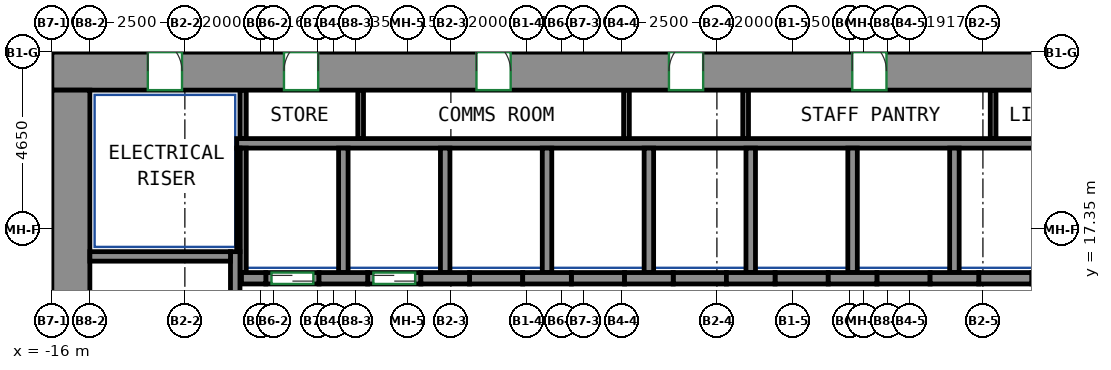
"""IFC4 building model, lengths in metres.
Left out: names, types, materials, properties, quantities, classifications, styles, units other than length and angle.
Written with IfcOpenShell. Run it as: python <this file> out.ifc"""

import sys

from ifc_helpers import new_model, si_unit, direction, frame, frame_2d, origin, place, context, subcontext, project, spatial, rectangle, extrude, source, transform, mapped, element, fill, save


model = new_model("IFC4")
c1 = context("Model", 3, precision=1e-05, world=origin(), true_north=direction((0.0, 1.0)))
c2 = subcontext(c1, "Body", "Model", "MODEL_VIEW")
j1 = project(units=[si_unit("LENGTHUNIT", "METRE"), si_unit("PLANEANGLEUNIT", "RADIAN")], contexts=[c1])
p1 = place(None, origin())
s1 = spatial("IfcSite", under=j1, at=p1, CompositionType="ELEMENT")
p2 = place(p1, origin())
s2 = spatial("IfcBuilding", under=s1, at=p2, CompositionType="ELEMENT")
p3 = place(p2, frame((0.0, 0.0, 75.2)))
s3 = spatial("IfcBuildingStorey", under=s2, at=p3, CompositionType="ELEMENT", Elevation=75.2)
m1 = source(origin(), c2, "Body", "SweptSolid", [
    extrude(rectangle(XDim=34.1, YDim=1.0, at=frame_2d((17.05, 0.0))), origin(), (0.0, 0.0, 1.0), 3.72),
])
p4 = place(p3, frame((-16.0, 21.5, 0.0), z_axis=(0.0, 0.0, 1.0), x_axis=(1.0, 0.0, 0.0)))
e1 = element("IfcWall", 1, at=p4, inside=s3, PredefinedType="SHEAR", context=c2, shape_type="MappedRepresentation", body=[
    mapped(m1, transform((0.0, 0.0, 0.0))),
])
p5 = place(p4, frame((6.108, 0.0, 0.0)))
e2 = element("IfcOpeningElement", 2, at=p5, cuts=e1, PredefinedType="OPENING", context=c2, shape_type="SweptSolid", body=[
    extrude(rectangle(XDim=0.9, YDim=2.1, at=frame_2d((0.45, 1.05))), frame((0.0, 0.51, 0.0), z_axis=(0.0, -1.0, 0.0), x_axis=(1.0, 0.0, 0.0)), (0.0, 0.0, 1.0), 1.02),
])
p6 = place(p4, frame((11.173, 0.0, 0.0)))
e3 = element("IfcOpeningElement", 3, at=p6, cuts=e1, PredefinedType="OPENING", context=c2, shape_type="SweptSolid", body=[
    extrude(rectangle(XDim=0.9, YDim=2.1, at=frame_2d((0.45, 1.05))), frame((0.0, 0.51, 0.0), z_axis=(0.0, -1.0, 0.0), x_axis=(1.0, 0.0, 0.0)), (0.0, 0.0, 1.0), 1.02),
])
p7 = place(p4, frame((16.238, 0.0, 0.0)))
e4 = element("IfcOpeningElement", 4, at=p7, cuts=e1, PredefinedType="OPENING", context=c2, shape_type="SweptSolid", body=[
    extrude(rectangle(XDim=0.9, YDim=2.1, at=frame_2d((0.45, 1.05))), frame((0.0, 0.51, 0.0), z_axis=(0.0, -1.0, 0.0), x_axis=(1.0, 0.0, 0.0)), (0.0, 0.0, 1.0), 1.02),
])
p8 = place(p4, frame((21.062, 0.0, 0.0)))
e5 = element("IfcOpeningElement", 5, at=p8, cuts=e1, PredefinedType="OPENING", context=c2, shape_type="SweptSolid", body=[
    extrude(rectangle(XDim=0.9, YDim=2.1, at=frame_2d((0.45, 1.05))), frame((0.0, 0.51, 0.0), z_axis=(0.0, -1.0, 0.0), x_axis=(1.0, 0.0, 0.0)), (0.0, 0.0, 1.0), 1.02),
])
p9 = place(p4, frame((26.489, 0.0, 0.0)))
e6 = element("IfcOpeningElement", 6, at=p9, cuts=e1, PredefinedType="OPENING", context=c2, shape_type="SweptSolid", body=[
    extrude(rectangle(XDim=0.9, YDim=2.1, at=frame_2d((0.45, 1.05))), frame((0.0, 0.51, 0.0), z_axis=(0.0, -1.0, 0.0), x_axis=(1.0, 0.0, 0.0)), (0.0, 0.0, 1.0), 1.02),
])
p10 = place(p4, frame((2.525, 0.0, 0.0)))
e7 = element("IfcOpeningElement", 7, at=p10, cuts=e1, PredefinedType="OPENING", context=c2, shape_type="SweptSolid", body=[
    extrude(rectangle(XDim=0.9, YDim=2.1, at=frame_2d((0.45, 1.05))), frame((0.0, 0.51, 0.0), z_axis=(0.0, -1.0, 0.0), x_axis=(1.0, 0.0, 0.0)), (0.0, 0.0, 1.0), 1.02),
])
p11 = place(p4, frame((30.675, 0.0, 0.0)))
e8 = element("IfcOpeningElement", 8, at=p11, cuts=e1, PredefinedType="OPENING", context=c2, shape_type="SweptSolid", body=[
    extrude(rectangle(XDim=0.9, YDim=2.1, at=frame_2d((0.45, 1.05))), frame((0.0, 0.51, 0.0), z_axis=(0.0, -1.0, 0.0), x_axis=(1.0, 0.0, 0.0)), (0.0, 0.0, 1.0), 1.02),
])
m2 = source(origin(), c2, "Body", "SweptSolid", [
    extrude(rectangle(XDim=12.0, YDim=1.0, at=frame_2d((6.0, 0.0))), origin(), (0.0, 0.0, 1.0), 3.72),
])
p12 = place(p3, frame((-15.5, 9.0, 0.0), z_axis=(0.0, 0.0, 1.0), x_axis=(0.0, 1.0, 0.0)))
e9 = element("IfcWall", 9, at=p12, inside=s3, PredefinedType="SHEAR", context=c2, shape_type="MappedRepresentation", body=[
    mapped(m2, transform((0.0, 0.0, 0.0))),
])
m3 = source(origin(), c2, "Body", "SweptSolid", [
    extrude(rectangle(XDim=7.75, YDim=0.25, at=frame_2d((3.875, 0.0))), origin(), (0.0, 0.0, 1.0), 3.72),
])
p13 = place(p3, frame((-11.175, 9.0, 0.0), z_axis=(0.0, 0.0, 1.0), x_axis=(0.0, 1.0, 0.0)))
e10 = element("IfcWall", 10, at=p13, inside=s3, PredefinedType="SHEAR", context=c2, shape_type="MappedRepresentation", body=[
    mapped(m3, transform((0.0, 0.0, 0.0))),
])
m4 = source(origin(), c2, "Body", "SweptSolid", [
    extrude(rectangle(XDim=3.7, YDim=0.25, at=frame_2d((1.85, 0.0))), origin(), (0.0, 0.0, 1.0), 3.72),
])
p14 = place(p3, frame((-15.0, 16.625, 0.0), z_axis=(0.0, 0.0, 1.0), x_axis=(1.0, 0.0, 0.0)))
e11 = element("IfcWall", 11, at=p14, inside=s3, PredefinedType="SHEAR", context=c2, shape_type="MappedRepresentation", body=[
    mapped(m4, transform((0.0, 0.0, 0.0))),
])
m5 = source(origin(), c2, "Body", "SweptSolid", [
    extrude(rectangle(XDim=0.64, YDim=0.3, at=frame_2d((0.32, 0.0))), origin(), (0.0, 0.0, 1.0), 3.72),
])
p15 = place(p3, frame((-11.01, 16.05, 0.0), z_axis=(0.0, 0.0, 1.0), x_axis=(1.0, 0.0, 0.0)))
e12 = element("IfcWall", 12, at=p15, inside=s3, PredefinedType="SHEAR", context=c2, shape_type="MappedRepresentation", body=[
    mapped(m5, transform((0.0, 0.0, 0.0))),
])
m6 = source(origin(), c2, "Body", "SweptSolid", [
    extrude(rectangle(XDim=1.28, YDim=0.3, at=frame_2d((0.64, 0.0))), origin(), (0.0, 0.0, 1.0), 3.72),
])
for number, where, z_axis, x_axis in (
    (13, (-8.97, 16.05, 0.0), (0.0, 0.0, 1.0), (1.0, 0.0, 0.0)),
    (14, (-6.29, 16.05, 0.0), (0.0, 0.0, 1.0), (1.0, 0.0, 0.0)),
    (15, (-3.61, 16.05, 0.0), (0.0, 0.0, 1.0), (1.0, 0.0, 0.0)),
    (16, (-0.93, 16.05, 0.0), (0.0, 0.0, 1.0), (1.0, 0.0, 0.0)),
    (17, (1.75, 16.05, 0.0), (0.0, 0.0, 1.0), (1.0, 0.0, 0.0)),
    (18, (4.43, 16.05, 0.0), (0.0, 0.0, 1.0), (1.0, 0.0, 0.0)),
):
    element("IfcWall", number, at=place(p3, frame(where, z_axis=z_axis, x_axis=x_axis)), inside=s3, PredefinedType="SHEAR", context=c2, shape_type="MappedRepresentation", body=[
        mapped(m6, transform((0.0, 0.0, 0.0))),
    ])
m7 = source(origin(), c2, "Body", "SweptSolid", [
    extrude(rectangle(XDim=1.28, YDim=0.3, at=frame_2d((0.64, 0.0))), origin(), (0.0, 0.0, 1.0), 3.72),
])
p16 = place(p3, frame((7.11, 16.05, 0.0), z_axis=(0.0, 0.0, 1.0), x_axis=(1.0, 0.0, 0.0)))
e19 = element("IfcWall", 19, at=p16, inside=s3, PredefinedType="SHEAR", context=c2, shape_type="MappedRepresentation", body=[
    mapped(m7, transform((0.0, 0.0, 0.0))),
])
m8 = source(origin(), c2, "Body", "SweptSolid", [
    extrude(rectangle(XDim=1.4, YDim=0.3, at=frame_2d((0.7, 0.0))), origin(), (0.0, 0.0, 1.0), 3.72),
])
p17 = place(p3, frame((-10.37, 16.05, 0.0), z_axis=(0.0, 0.0, 1.0), x_axis=(1.0, 0.0, 0.0)))
e20 = element("IfcWall", 20, at=p17, inside=s3, PredefinedType="PARTITIONING", context=c2, shape_type="MappedRepresentation", body=[
    mapped(m8, transform((0.0, 0.0, 0.0))),
])
p18 = place(p17, frame((0.15, 0.0, 0.0)))
e21 = element("IfcOpeningElement", 21, at=p18, cuts=e20, PredefinedType="OPENING", context=c2, shape_type="SweptSolid", body=[
    extrude(rectangle(XDim=1.1, YDim=2.1, at=frame_2d((0.55, 1.05))), frame((0.0, 0.16, 0.0), z_axis=(0.0, -1.0, 0.0), x_axis=(1.0, 0.0, 0.0)), (0.0, 0.0, 1.0), 0.32),
])
m9 = source(origin(), c2, "Body", "SweptSolid", [
    extrude(rectangle(XDim=1.4, YDim=0.3, at=frame_2d((0.7, 0.0))), origin(), (0.0, 0.0, 1.0), 3.72),
])
p19 = place(p3, frame((-7.69, 16.05, 0.0), z_axis=(0.0, 0.0, 1.0), x_axis=(1.0, 0.0, 0.0)))
e22 = element("IfcWall", 22, at=p19, inside=s3, PredefinedType="PARTITIONING", context=c2, shape_type="MappedRepresentation", body=[
    mapped(m9, transform((0.0, 0.0, 0.0))),
])
p20 = place(p19, frame((0.15, 0.0, 0.0)))
e23 = element("IfcOpeningElement", 23, at=p20, cuts=e22, PredefinedType="OPENING", context=c2, shape_type="SweptSolid", body=[
    extrude(rectangle(XDim=1.1, YDim=2.1, at=frame_2d((0.55, 1.05))), frame((0.0, 0.16, 0.0), z_axis=(0.0, -1.0, 0.0), x_axis=(1.0, 0.0, 0.0)), (0.0, 0.0, 1.0), 0.32),
])
p21 = place(p3, frame((-5.01, 16.05, 0.0), z_axis=(0.0, 0.0, 1.0), x_axis=(1.0, 0.0, 0.0)))
e24 = element("IfcWall", 24, at=p21, inside=s3, PredefinedType="PARTITIONING", context=c2, shape_type="MappedRepresentation", body=[
    mapped(m9, transform((0.0, 0.0, 0.0))),
])
p22 = place(p3, frame((-2.33, 16.05, 0.0), z_axis=(0.0, 0.0, 1.0), x_axis=(1.0, 0.0, 0.0)))
e25 = element("IfcWall", 25, at=p22, inside=s3, PredefinedType="PARTITIONING", context=c2, shape_type="MappedRepresentation", body=[
    mapped(m8, transform((0.0, 0.0, 0.0))),
])
for number, where, z_axis, x_axis in (
    (26, (0.35, 16.05, 0.0), (0.0, 0.0, 1.0), (1.0, 0.0, 0.0)),
    (27, (3.03, 16.05, 0.0), (0.0, 0.0, 1.0), (1.0, 0.0, 0.0)),
):
    element("IfcWall", number, at=place(p3, frame(where, z_axis=z_axis, x_axis=x_axis)), inside=s3, PredefinedType="PARTITIONING", context=c2, shape_type="MappedRepresentation", body=[
        mapped(m9, transform((0.0, 0.0, 0.0))),
    ])
for number, where, z_axis, x_axis in (
    (28, (5.71, 16.05, 0.0), (0.0, 0.0, 1.0), (1.0, 0.0, 0.0)),
    (29, (8.39, 16.05, 0.0), (0.0, 0.0, 1.0), (1.0, 0.0, 0.0)),
):
    element("IfcWall", number, at=place(p3, frame(where, z_axis=z_axis, x_axis=x_axis)), inside=s3, PredefinedType="PARTITIONING", context=c2, shape_type="MappedRepresentation", body=[
        mapped(m8, transform((0.0, 0.0, 0.0))),
    ])
m10 = source(origin(), c2, "Body", "SweptSolid", [
    extrude(rectangle(XDim=24.37, YDim=0.25, at=frame_2d((12.185, 0.0))), origin(), (0.0, 0.0, 1.0), 3.72),
])
p23 = place(p3, frame((-11.135, 19.6, 0.0), z_axis=(0.0, 0.0, 1.0), x_axis=(1.0, 0.0, 0.0)))
e30 = element("IfcWall", 30, at=p23, inside=s3, PredefinedType="PARTITIONING", context=c2, shape_type="MappedRepresentation", body=[
    mapped(m10, transform((0.0, 0.0, 0.0))),
])
m11 = source(origin(), c2, "Body", "SweptSolid", [
    extrude(rectangle(XDim=3.275, YDim=0.165, at=frame_2d((1.638, 0.0))), origin(), (0.0, 0.0, 1.0), 3.72),
])
p24 = place(p3, frame((-10.968, 16.2, 0.0), z_axis=(0.0, 0.0, 1.0), x_axis=(0.0, 1.0, 0.0)))
e31 = element("IfcWall", 31, at=p24, inside=s3, PredefinedType="PARTITIONING", context=c2, shape_type="MappedRepresentation", body=[
    mapped(m11, transform((0.0, 0.0, 0.0))),
])
m12 = source(origin(), c2, "Body", "SweptSolid", [
    extrude(rectangle(XDim=1.275, YDim=0.165, at=frame_2d((0.637, 0.0))), origin(), (0.0, 0.0, 1.0), 3.72),
])
p25 = place(p3, frame((-10.968, 19.725, 0.0), z_axis=(0.0, 0.0, 1.0), x_axis=(0.0, 1.0, 0.0)))
e32 = element("IfcWall", 32, at=p25, inside=s3, PredefinedType="PARTITIONING", context=c2, shape_type="MappedRepresentation", body=[
    mapped(m12, transform((0.0, 0.0, 0.0))),
])
m13 = source(origin(), c2, "Body", "SweptSolid", [
    extrude(rectangle(XDim=3.275, YDim=0.25, at=frame_2d((1.638, 0.0))), origin(), (0.0, 0.0, 1.0), 3.72),
])
for number, where, z_axis, x_axis in (
    (33, (2.39, 16.2, 0.0), (0.0, 0.0, 1.0), (0.0, 1.0, 0.0)),
    (34, (5.07, 16.2, 0.0), (0.0, 0.0, 1.0), (0.0, 1.0, 0.0)),
    (35, (7.75, 16.2, 0.0), (0.0, 0.0, 1.0), (0.0, 1.0, 0.0)),
    (36, (-0.29, 16.2, 0.0), (0.0, 0.0, 1.0), (0.0, 1.0, 0.0)),
):
    element("IfcWall", number, at=place(p3, frame(where, z_axis=z_axis, x_axis=x_axis)), inside=s3, PredefinedType="PARTITIONING", context=c2, shape_type="MappedRepresentation", body=[
        mapped(m13, transform((0.0, 0.0, 0.0))),
    ])
m14 = source(origin(), c2, "Body", "SweptSolid", [
    extrude(rectangle(XDim=2.725, YDim=0.085, at=frame_2d((1.363, 0.0))), origin(), (0.0, 0.0, 1.0), 3.72),
])
p26 = place(p3, frame((-11.093, 16.75, 0.0), z_axis=(0.0, 0.0, 1.0), x_axis=(0.0, 1.0, 0.0)))
e37 = element("IfcWall", 37, at=p26, inside=s3, PredefinedType="PARTITIONING", context=c2, shape_type="MappedRepresentation", body=[
    mapped(m14, transform((0.0, 0.0, 0.0))),
])
for number, where, z_axis, x_axis in (
    (38, (-2.97, 16.2, 0.0), (0.0, 0.0, 1.0), (0.0, 1.0, 0.0)),
    (39, (-5.65, 16.2, 0.0), (0.0, 0.0, 1.0), (0.0, 1.0, 0.0)),
    (40, (-8.33, 16.2, 0.0), (0.0, 0.0, 1.0), (0.0, 1.0, 0.0)),
):
    element("IfcWall", number, at=place(p3, frame(where, z_axis=z_axis, x_axis=x_axis)), inside=s3, PredefinedType="PARTITIONING", context=c2, shape_type="MappedRepresentation", body=[
        mapped(m13, transform((0.0, 0.0, 0.0))),
    ])
m15 = source(origin(), c2, "Body", "SweptSolid", [
    extrude(rectangle(XDim=1.275, YDim=0.15, at=frame_2d((0.637, 0.0))), origin(), (0.0, 0.0, 1.0), 3.72),
])
for number, where, z_axis, x_axis in (
    (41, (-7.875, 19.725, 0.0), (0.0, 0.0, 1.0), (0.0, 1.0, 0.0)),
    (42, (-0.88, 19.725, 0.0), (0.0, 0.0, 1.0), (0.0, 1.0, 0.0)),
    (43, (2.256, 19.725, 0.0), (0.0, 0.0, 1.0), (0.0, 1.0, 0.0)),
    (44, (8.768, 19.725, 0.0), (0.0, 0.0, 1.0), (0.0, 1.0, 0.0)),
):
    element("IfcWall", number, at=place(p3, frame(where, z_axis=z_axis, x_axis=x_axis)), inside=s3, PredefinedType="PARTITIONING", context=c2, shape_type="MappedRepresentation", body=[
        mapped(m15, transform((0.0, 0.0, 0.0))),
    ])
p27 = place(p18, origin())
e45 = element("IfcDoor", 45, at=p27, inside=s3, OperationType="DOUBLE_DOOR_SLIDING", PredefinedType="DOOR", context=c2, shape_type="SweptSolid", body=[
    extrude(rectangle(XDim=1.1, YDim=2.1, at=frame_2d((0.55, 1.05))), frame((0.0, 0.025, 0.0), z_axis=(0.0, -1.0, 0.0), x_axis=(1.0, 0.0, 0.0)), (0.0, 0.0, 1.0), 0.05),
])
fill(e21, e45)
p28 = place(p20, origin())
e46 = element("IfcDoor", 46, at=p28, inside=s3, OperationType="DOUBLE_DOOR_SLIDING", PredefinedType="DOOR", context=c2, shape_type="SweptSolid", body=[
    extrude(rectangle(XDim=1.1, YDim=2.1, at=frame_2d((0.55, 1.05))), frame((0.0, 0.025, 0.0), z_axis=(0.0, -1.0, 0.0), x_axis=(1.0, 0.0, 0.0)), (0.0, 0.0, 1.0), 0.05),
])
fill(e23, e46)
p29 = place(p5, origin())
e47 = element("IfcDoor", 47, at=p29, inside=s3, OperationType="SINGLE_SWING_RIGHT", PredefinedType="DOOR", context=c2, shape_type="SweptSolid", body=[
    extrude(rectangle(XDim=0.9, YDim=2.1, at=frame_2d((0.45, 1.05))), frame((0.0, -0.355, 0.0), z_axis=(0.0, -1.0, 0.0), x_axis=(1.0, 0.0, 0.0)), (0.0, 0.0, 1.0), 0.05),
])
fill(e2, e47)
p30 = place(p6, origin())
e48 = element("IfcDoor", 48, at=p30, inside=s3, OperationType="SINGLE_SWING_LEFT", PredefinedType="DOOR", context=c2, shape_type="SweptSolid", body=[
    extrude(rectangle(XDim=0.9, YDim=2.1, at=frame_2d((0.45, 1.05))), frame((0.0, -0.355, 0.0), z_axis=(0.0, -1.0, 0.0), x_axis=(1.0, 0.0, 0.0)), (0.0, 0.0, 1.0), 0.05),
])
fill(e3, e48)
p31 = place(p7, origin())
e49 = element("IfcDoor", 49, at=p31, inside=s3, OperationType="SINGLE_SWING_RIGHT", PredefinedType="DOOR", context=c2, shape_type="SweptSolid", body=[
    extrude(rectangle(XDim=0.9, YDim=2.1, at=frame_2d((0.45, 1.05))), frame((0.0, -0.355, 0.0), z_axis=(0.0, -1.0, 0.0), x_axis=(1.0, 0.0, 0.0)), (0.0, 0.0, 1.0), 0.05),
])
fill(e4, e49)
p32 = place(p8, origin())
e50 = element("IfcDoor", 50, at=p32, inside=s3, OperationType="SINGLE_SWING_LEFT", PredefinedType="DOOR", context=c2, shape_type="SweptSolid", body=[
    extrude(rectangle(XDim=0.9, YDim=2.1, at=frame_2d((0.45, 1.05))), frame((0.0, -0.355, 0.0), z_axis=(0.0, -1.0, 0.0), x_axis=(1.0, 0.0, 0.0)), (0.0, 0.0, 1.0), 0.05),
])
fill(e5, e50)
p33 = place(p10, origin())
e51 = element("IfcDoor", 51, at=p33, inside=s3, OperationType="SINGLE_SWING_LEFT", PredefinedType="DOOR", context=c2, shape_type="SweptSolid", body=[
    extrude(rectangle(XDim=0.9, YDim=2.1, at=frame_2d((0.45, 1.05))), frame((0.0, -0.355, 0.0), z_axis=(0.0, -1.0, 0.0), x_axis=(1.0, 0.0, 0.0)), (0.0, 0.0, 1.0), 0.05),
])
fill(e7, e51)
save(model, sys.argv[1])
